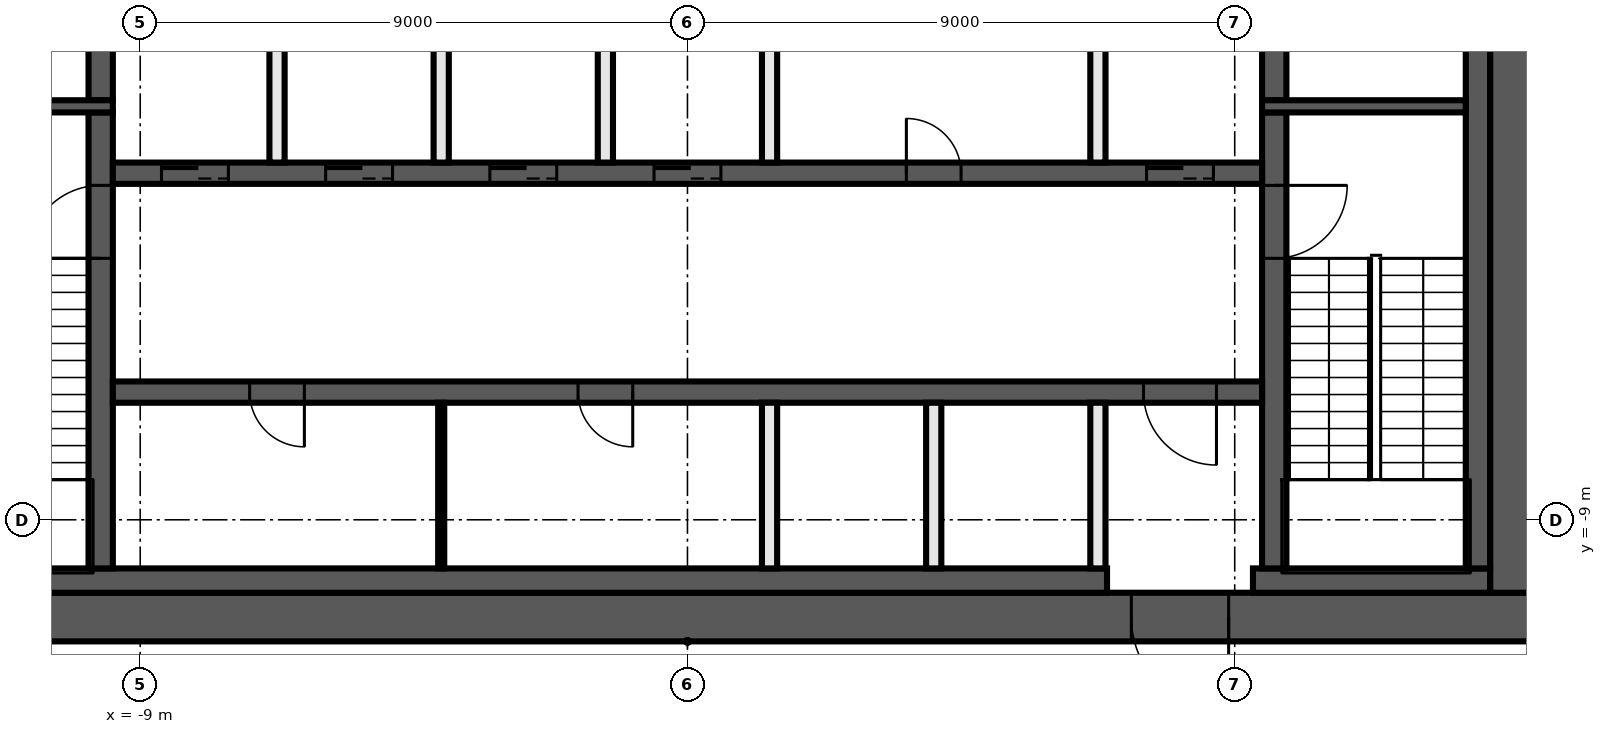
"""IFC4 building model, lengths in metres.
Left out: names, types, materials, properties, quantities, classifications, styles, units other than length and angle.
Written with IfcOpenShell. Run it as: python <this file> out.ifc"""

import sys

from ifc_helpers import new_model, si_unit, direction, frame, frame_2d, origin, place, context, subcontext, project, spatial, rectangle, extrude, element, fill, save


model = new_model("IFC4")
c1 = context("Model", 3, precision=1e-05, world=origin(), true_north=direction((0.0, 1.0)))
c2 = subcontext(c1, "Body", "Model", "MODEL_VIEW")
j1 = project(units=[si_unit("LENGTHUNIT", "METRE"), si_unit("PLANEANGLEUNIT", "RADIAN")], contexts=[c1])
p1 = place(None, origin())
s1 = spatial("IfcSite", under=j1, at=p1, CompositionType="ELEMENT")
p2 = place(p1, origin())
s2 = spatial("IfcBuilding", under=s1, at=p2, CompositionType="ELEMENT")
p3 = place(p2, frame((0.0, 0.0, 215.6)))
s3 = spatial("IfcBuildingStorey", under=s2, at=p3, CompositionType="ELEMENT", Elevation=215.6)
p4 = place(p3, frame((14.0, -10.6, 0.0), z_axis=(0.0, 0.0, 1.0), x_axis=(-1.0, 0.0, 0.0)))
e1 = element("IfcWall", 1, at=p4, inside=s3, PredefinedType="SHEAR", context=c2, shape_type="SweptSolid", body=[
    extrude(rectangle(XDim=28.0, YDim=0.8, at=frame_2d((14.0, 0.0))), origin(), (0.0, 0.0, 1.0), 4.4),
])
p5 = place(p4, frame((5.1, 0.0, 0.0)))
e2 = element("IfcOpeningElement", 2, at=p5, cuts=e1, PredefinedType="OPENING", context=c2, shape_type="SweptSolid", body=[
    extrude(rectangle(XDim=1.6, YDim=2.1, at=frame_2d((0.8, 1.05))), frame((0.0, 0.41, 0.0), z_axis=(0.0, -1.0, 0.0), x_axis=(1.0, 0.0, 0.0)), (0.0, 0.0, 1.0), 0.82),
])
p6 = place(p3, frame((13.6, 10.2, 0.0), z_axis=(0.0, 0.0, 1.0), x_axis=(0.0, -1.0, 0.0)))
e3 = element("IfcWall", 3, at=p6, inside=s3, PredefinedType="SHEAR", context=c2, shape_type="SweptSolid", body=[
    extrude(rectangle(XDim=20.4, YDim=0.8, at=frame_2d((10.2, 0.0))), origin(), (0.0, 0.0, 1.0), 4.4),
])
p7 = place(p3, frame((13.2, -10.0, 0.0), z_axis=(0.0, 0.0, 1.0), x_axis=(-1.0, 0.0, 0.0)))
e4 = element("IfcWall", 4, at=p7, inside=s3, PredefinedType="SHEAR", context=c2, shape_type="SweptSolid", body=[
    extrude(rectangle(XDim=3.9, YDim=0.4, at=frame_2d((1.95, 0.0))), origin(), (0.0, 0.0, 1.0), 4.4),
])
p8 = place(p3, frame((6.9, -10.0, 0.0), z_axis=(0.0, 0.0, 1.0), x_axis=(-1.0, 0.0, 0.0)))
e5 = element("IfcWall", 5, at=p8, inside=s3, PredefinedType="SHEAR", context=c2, shape_type="SweptSolid", body=[
    extrude(rectangle(XDim=20.1, YDim=0.4, at=frame_2d((10.05, 0.0))), origin(), (0.0, 0.0, 1.0), 4.4),
])
p9 = place(p3, frame((13.0, 9.8, 0.0), z_axis=(0.0, 0.0, 1.0), x_axis=(0.0, -1.0, 0.0)))
e6 = element("IfcWall", 6, at=p9, inside=s3, PredefinedType="SHEAR", context=c2, shape_type="SweptSolid", body=[
    extrude(rectangle(XDim=19.6, YDim=0.4, at=frame_2d((9.8, 0.0))), origin(), (0.0, 0.0, 1.0), 4.4),
])
p10 = place(p3, frame((9.65, -2.3, 0.0), z_axis=(0.0, 0.0, 1.0), x_axis=(0.0, -1.0, 0.0)))
e7 = element("IfcWall", 7, at=p10, inside=s3, PredefinedType="SHEAR", context=c2, shape_type="SweptSolid", body=[
    extrude(rectangle(XDim=7.5, YDim=0.4, at=frame_2d((3.75, 0.0))), origin(), (0.0, 0.0, 1.0), 4.4),
])
p11 = place(p10, frame((1.2, 0.0, 0.0)))
e8 = element("IfcOpeningElement", 8, at=p11, cuts=e7, PredefinedType="OPENING", context=c2, shape_type="SweptSolid", body=[
    extrude(rectangle(XDim=1.2, YDim=2.1, at=frame_2d((0.6, 1.05))), frame((0.0, 0.21, 0.0), z_axis=(0.0, -1.0, 0.0), x_axis=(1.0, 0.0, 0.0)), (0.0, 0.0, 1.0), 0.42),
])
p12 = place(p3, frame((9.65, 2.1, 0.0), z_axis=(0.0, 0.0, 1.0), x_axis=(0.0, -1.0, 0.0)))
e9 = element("IfcWall", 9, at=p12, inside=s3, PredefinedType="SHEAR", context=c2, shape_type="SweptSolid", body=[
    extrude(rectangle(XDim=4.2, YDim=0.4, at=frame_2d((2.1, 0.0))), origin(), (0.0, 0.0, 1.0), 4.4),
])
p13 = place(p12, frame((0.15, 0.0, 0.0)))
e10 = element("IfcOpeningElement", 10, at=p13, cuts=e9, PredefinedType="OPENING", context=c2, shape_type="SweptSolid", body=[
    extrude(rectangle(XDim=0.9, YDim=2.1, at=frame_2d((0.45, 1.05))), frame((0.0, 0.21, 0.0), z_axis=(0.0, -1.0, 0.0), x_axis=(1.0, 0.0, 0.0)), (0.0, 0.0, 1.0), 0.42),
])
p14 = place(p3, frame((-9.65, -9.8, 0.0), z_axis=(0.0, 0.0, 1.0), x_axis=(0.0, 1.0, 0.0)))
e11 = element("IfcWall", 11, at=p14, inside=s3, PredefinedType="SHEAR", context=c2, shape_type="SweptSolid", body=[
    extrude(rectangle(XDim=7.5, YDim=0.4, at=frame_2d((3.75, 0.0))), origin(), (0.0, 0.0, 1.0), 4.4),
])
p15 = place(p14, frame((5.1, 0.0, 0.0)))
e12 = element("IfcOpeningElement", 12, at=p15, cuts=e11, PredefinedType="OPENING", context=c2, shape_type="SweptSolid", body=[
    extrude(rectangle(XDim=1.2, YDim=2.1, at=frame_2d((0.6, 1.05))), frame((0.0, 0.21, 0.0), z_axis=(0.0, -1.0, 0.0), x_axis=(1.0, 0.0, 0.0)), (0.0, 0.0, 1.0), 0.42),
])
p16 = place(p3, frame((-9.65, -2.1, 0.0), z_axis=(0.0, 0.0, 1.0), x_axis=(0.0, 1.0, 0.0)))
e13 = element("IfcWall", 13, at=p16, inside=s3, PredefinedType="SHEAR", context=c2, shape_type="SweptSolid", body=[
    extrude(rectangle(XDim=4.2, YDim=0.4, at=frame_2d((2.1, 0.0))), origin(), (0.0, 0.0, 1.0), 4.4),
])
for number, where, z_axis, x_axis in (
    (14, (9.45, -2.2, 0.0), (0.0, 0.0, 1.0), (1.0, 0.0, 0.0)),
    (15, (-9.45, -2.2, 0.0), (0.0, 0.0, 1.0), (-1.0, 0.0, 0.0)),
):
    element("IfcWall", number, at=place(p3, frame(where, z_axis=z_axis, x_axis=x_axis)), inside=s3, PredefinedType="SHEAR", context=c2, shape_type="SweptSolid", body=[
        extrude(rectangle(XDim=3.35, YDim=0.2, at=frame_2d((1.675, 0.0))), origin(), (0.0, 0.0, 1.0), 4.4),
    ])
p17 = place(p3, frame((-9.45, -3.3, 0.0), z_axis=(0.0, 0.0, 1.0), x_axis=(1.0, 0.0, 0.0)))
e16 = element("IfcWall", 16, at=p17, inside=s3, PredefinedType="SHEAR", context=c2, shape_type="SweptSolid", body=[
    extrude(rectangle(XDim=18.9, YDim=0.35, at=frame_2d((9.45, 0.0))), origin(), (0.0, 0.0, 1.0), 4.4),
])
p18 = place(p17, frame((0.8, 0.0, 0.0)))
e17 = element("IfcOpeningElement", 17, at=p18, cuts=e16, PredefinedType="OPENING", context=c2, shape_type="SweptSolid", body=[
    extrude(rectangle(XDim=1.1, YDim=2.1, at=frame_2d((0.55, 1.05))), frame((0.0, 0.185, 0.0), z_axis=(0.0, -1.0, 0.0), x_axis=(1.0, 0.0, 0.0)), (0.0, 0.0, 1.0), 0.37),
])
p19 = place(p17, frame((3.5, 0.0, 0.0)))
e18 = element("IfcOpeningElement", 18, at=p19, cuts=e16, PredefinedType="OPENING", context=c2, shape_type="SweptSolid", body=[
    extrude(rectangle(XDim=1.1, YDim=2.1, at=frame_2d((0.55, 1.05))), frame((0.0, 0.185, 0.0), z_axis=(0.0, -1.0, 0.0), x_axis=(1.0, 0.0, 0.0)), (0.0, 0.0, 1.0), 0.37),
])
p20 = place(p17, frame((6.2, 0.0, 0.0)))
e19 = element("IfcOpeningElement", 19, at=p20, cuts=e16, PredefinedType="OPENING", context=c2, shape_type="SweptSolid", body=[
    extrude(rectangle(XDim=1.1, YDim=2.1, at=frame_2d((0.55, 1.05))), frame((0.0, 0.185, 0.0), z_axis=(0.0, -1.0, 0.0), x_axis=(1.0, 0.0, 0.0)), (0.0, 0.0, 1.0), 0.37),
])
p21 = place(p17, frame((8.9, 0.0, 0.0)))
e20 = element("IfcOpeningElement", 20, at=p21, cuts=e16, PredefinedType="OPENING", context=c2, shape_type="SweptSolid", body=[
    extrude(rectangle(XDim=1.1, YDim=2.1, at=frame_2d((0.55, 1.05))), frame((0.0, 0.185, 0.0), z_axis=(0.0, -1.0, 0.0), x_axis=(1.0, 0.0, 0.0)), (0.0, 0.0, 1.0), 0.37),
])
p22 = place(p17, frame((17.0, 0.0, 0.0)))
e21 = element("IfcOpeningElement", 21, at=p22, cuts=e16, PredefinedType="OPENING", context=c2, shape_type="SweptSolid", body=[
    extrude(rectangle(XDim=1.1, YDim=2.1, at=frame_2d((0.55, 1.05))), frame((0.0, 0.185, 0.0), z_axis=(0.0, -1.0, 0.0), x_axis=(1.0, 0.0, 0.0)), (0.0, 0.0, 1.0), 0.37),
])
p23 = place(p17, frame((13.05, 0.0, 0.0)))
e22 = element("IfcOpeningElement", 22, at=p23, cuts=e16, PredefinedType="OPENING", context=c2, shape_type="SweptSolid", body=[
    extrude(rectangle(XDim=0.9, YDim=2.1, at=frame_2d((0.45, 1.05))), frame((0.0, 0.185, 0.0), z_axis=(0.0, -1.0, 0.0), x_axis=(1.0, 0.0, 0.0)), (0.0, 0.0, 1.0), 0.37),
])
p24 = place(p3, frame((9.45, -6.9, 0.0), z_axis=(0.0, 0.0, 1.0), x_axis=(-1.0, 0.0, 0.0)))
e23 = element("IfcWall", 23, at=p24, inside=s3, PredefinedType="SHEAR", context=c2, shape_type="SweptSolid", body=[
    extrude(rectangle(XDim=18.9, YDim=0.35, at=frame_2d((9.45, 0.0))), origin(), (0.0, 0.0, 1.0), 4.4),
])
p25 = place(p24, frame((0.75, 0.0, 0.0)))
e24 = element("IfcOpeningElement", 24, at=p25, cuts=e23, PredefinedType="OPENING", context=c2, shape_type="SweptSolid", body=[
    extrude(rectangle(XDim=1.2, YDim=2.1, at=frame_2d((0.6, 1.05))), frame((0.0, 0.185, 0.0), z_axis=(0.0, -1.0, 0.0), x_axis=(1.0, 0.0, 0.0)), (0.0, 0.0, 1.0), 0.37),
])
p26 = place(p24, frame((15.75, 0.0, 0.0)))
e25 = element("IfcOpeningElement", 25, at=p26, cuts=e23, PredefinedType="OPENING", context=c2, shape_type="SweptSolid", body=[
    extrude(rectangle(XDim=0.9, YDim=2.1, at=frame_2d((0.45, 1.05))), frame((0.0, 0.185, 0.0), z_axis=(0.0, -1.0, 0.0), x_axis=(1.0, 0.0, 0.0)), (0.0, 0.0, 1.0), 0.37),
])
p27 = place(p24, frame((10.35, 0.0, 0.0)))
e26 = element("IfcOpeningElement", 26, at=p27, cuts=e23, PredefinedType="OPENING", context=c2, shape_type="SweptSolid", body=[
    extrude(rectangle(XDim=0.9, YDim=2.1, at=frame_2d((0.45, 1.05))), frame((0.0, 0.185, 0.0), z_axis=(0.0, -1.0, 0.0), x_axis=(1.0, 0.0, 0.0)), (0.0, 0.0, 1.0), 0.37),
])
for number, where, z_axis, x_axis in (
    (27, (6.75, -9.8, 0.0), (0.0, 0.0, 1.0), (0.0, 1.0, 0.0)),
    (28, (6.75, -3.125, 0.0), (0.0, 0.0, 1.0), (0.0, 1.0, 0.0)),
    (29, (4.05, -9.8, 0.0), (0.0, 0.0, 1.0), (0.0, 1.0, 0.0)),
    (30, (1.35, -9.8, 0.0), (0.0, 0.0, 1.0), (0.0, 1.0, 0.0)),
    (31, (1.35, -3.125, 0.0), (0.0, 0.0, 1.0), (0.0, 1.0, 0.0)),
    (32, (-1.35, -3.125, 0.0), (0.0, 0.0, 1.0), (0.0, 1.0, 0.0)),
):
    element("IfcWall", number, at=place(p3, frame(where, z_axis=z_axis, x_axis=x_axis)), inside=s3, PredefinedType="SOLIDWALL", context=c2, shape_type="SweptSolid", body=[
        extrude(rectangle(XDim=2.725, YDim=0.25, at=frame_2d((1.363, 0.0))), origin(), (0.0, 0.0, 1.0), 4.4),
    ])
p28 = place(p3, frame((-4.05, -9.8, 0.0), z_axis=(0.0, 0.0, 1.0), x_axis=(0.0, 1.0, 0.0)))
e33 = element("IfcWall", 33, at=p28, inside=s3, PredefinedType="PARTITIONING", context=c2, shape_type="SweptSolid", body=[
    extrude(rectangle(XDim=2.725, YDim=0.1, at=frame_2d((1.363, 0.0))), origin(), (0.0, 0.0, 1.0), 4.4),
])
for number, where, z_axis, x_axis in (
    (34, (-4.05, -3.125, 0.0), (0.0, 0.0, 1.0), (0.0, 1.0, 0.0)),
    (35, (-6.75, -3.125, 0.0), (0.0, 0.0, 1.0), (0.0, 1.0, 0.0)),
):
    element("IfcWall", number, at=place(p3, frame(where, z_axis=z_axis, x_axis=x_axis)), inside=s3, PredefinedType="SOLIDWALL", context=c2, shape_type="SweptSolid", body=[
        extrude(rectangle(XDim=2.725, YDim=0.25, at=frame_2d((1.363, 0.0))), origin(), (0.0, 0.0, 1.0), 4.4),
    ])
p29 = place(p18, origin())
e36 = element("IfcDoor", 36, at=p29, inside=s3, OperationType="DOUBLE_DOOR_SLIDING", PredefinedType="DOOR", context=c2, shape_type="SweptSolid", body=[
    extrude(rectangle(XDim=1.1, YDim=2.1, at=frame_2d((0.55, 1.05))), frame((0.0, 0.025, 0.0), z_axis=(0.0, -1.0, 0.0), x_axis=(1.0, 0.0, 0.0)), (0.0, 0.0, 1.0), 0.05),
])
fill(e17, e36)
p30 = place(p19, origin())
e37 = element("IfcDoor", 37, at=p30, inside=s3, OperationType="DOUBLE_DOOR_SLIDING", PredefinedType="DOOR", context=c2, shape_type="SweptSolid", body=[
    extrude(rectangle(XDim=1.1, YDim=2.1, at=frame_2d((0.55, 1.05))), frame((0.0, 0.025, 0.0), z_axis=(0.0, -1.0, 0.0), x_axis=(1.0, 0.0, 0.0)), (0.0, 0.0, 1.0), 0.05),
])
fill(e18, e37)
p31 = place(p20, origin())
e38 = element("IfcDoor", 38, at=p31, inside=s3, OperationType="DOUBLE_DOOR_SLIDING", PredefinedType="DOOR", context=c2, shape_type="SweptSolid", body=[
    extrude(rectangle(XDim=1.1, YDim=2.1, at=frame_2d((0.55, 1.05))), frame((0.0, 0.025, 0.0), z_axis=(0.0, -1.0, 0.0), x_axis=(1.0, 0.0, 0.0)), (0.0, 0.0, 1.0), 0.05),
])
fill(e19, e38)
p32 = place(p21, origin())
e39 = element("IfcDoor", 39, at=p32, inside=s3, OperationType="DOUBLE_DOOR_SLIDING", PredefinedType="DOOR", context=c2, shape_type="SweptSolid", body=[
    extrude(rectangle(XDim=1.1, YDim=2.1, at=frame_2d((0.55, 1.05))), frame((0.0, 0.025, 0.0), z_axis=(0.0, -1.0, 0.0), x_axis=(1.0, 0.0, 0.0)), (0.0, 0.0, 1.0), 0.05),
])
fill(e20, e39)
p33 = place(p22, origin())
e40 = element("IfcDoor", 40, at=p33, inside=s3, OperationType="DOUBLE_DOOR_SLIDING", PredefinedType="DOOR", context=c2, shape_type="SweptSolid", body=[
    extrude(rectangle(XDim=1.1, YDim=2.1, at=frame_2d((0.55, 1.05))), frame((0.0, 0.025, 0.0), z_axis=(0.0, -1.0, 0.0), x_axis=(1.0, 0.0, 0.0)), (0.0, 0.0, 1.0), 0.05),
])
fill(e21, e40)
p34 = place(p5, origin())
e41 = element("IfcDoor", 41, at=p34, inside=s3, OperationType="DOUBLE_DOOR_SINGLE_SWING", PredefinedType="DOOR", context=c2, shape_type="SweptSolid", body=[
    extrude(rectangle(XDim=1.6, YDim=2.1, at=frame_2d((0.8, 1.05))), frame((0.0, 0.025, 0.0), z_axis=(0.0, -1.0, 0.0), x_axis=(1.0, 0.0, 0.0)), (0.0, 0.0, 1.0), 0.05),
])
fill(e2, e41)
p35 = place(p25, origin())
e42 = element("IfcDoor", 42, at=p35, inside=s3, OperationType="SINGLE_SWING_LEFT", PredefinedType="DOOR", context=c2, shape_type="SweptSolid", body=[
    extrude(rectangle(XDim=1.2, YDim=2.1, at=frame_2d((0.6, 1.05))), frame((0.0, 0.025, 0.0), z_axis=(0.0, -1.0, 0.0), x_axis=(1.0, 0.0, 0.0)), (0.0, 0.0, 1.0), 0.05),
])
fill(e24, e42)
p36 = place(p23, origin())
e43 = element("IfcDoor", 43, at=p36, inside=s3, OperationType="SINGLE_SWING_RIGHT", PredefinedType="DOOR", context=c2, shape_type="SweptSolid", body=[
    extrude(rectangle(XDim=0.9, YDim=2.1, at=frame_2d((0.45, 1.05))), frame((0.0, 0.025, 0.0), z_axis=(0.0, -1.0, 0.0), x_axis=(1.0, 0.0, 0.0)), (0.0, 0.0, 1.0), 0.05),
])
fill(e22, e43)
p37 = place(p26, origin())
e44 = element("IfcDoor", 44, at=p37, inside=s3, OperationType="SINGLE_SWING_LEFT", PredefinedType="DOOR", context=c2, shape_type="SweptSolid", body=[
    extrude(rectangle(XDim=0.9, YDim=2.1, at=frame_2d((0.45, 1.05))), frame((0.0, 0.025, 0.0), z_axis=(0.0, -1.0, 0.0), x_axis=(1.0, 0.0, 0.0)), (0.0, 0.0, 1.0), 0.05),
])
fill(e25, e44)
p38 = place(p27, origin())
e45 = element("IfcDoor", 45, at=p38, inside=s3, OperationType="SINGLE_SWING_RIGHT", PredefinedType="DOOR", context=c2, shape_type="SweptSolid", body=[
    extrude(rectangle(XDim=0.9, YDim=2.1, at=frame_2d((0.45, 1.05))), frame((0.0, 0.025, 0.0), z_axis=(0.0, -1.0, 0.0), x_axis=(1.0, 0.0, 0.0)), (0.0, 0.0, 1.0), 0.05),
])
fill(e26, e45)
p39 = place(p11, origin())
e46 = element("IfcDoor", 46, at=p39, inside=s3, OperationType="SINGLE_SWING_RIGHT", PredefinedType="DOOR", context=c2, shape_type="SweptSolid", body=[
    extrude(rectangle(XDim=1.2, YDim=2.1, at=frame_2d((0.6, 1.05))), frame((0.0, 0.025, 0.0), z_axis=(0.0, -1.0, 0.0), x_axis=(1.0, 0.0, 0.0)), (0.0, 0.0, 1.0), 0.05),
])
fill(e8, e46)
p40 = place(p15, origin())
e47 = element("IfcDoor", 47, at=p40, inside=s3, OperationType="SINGLE_SWING_LEFT", PredefinedType="DOOR", context=c2, shape_type="SweptSolid", body=[
    extrude(rectangle(XDim=1.2, YDim=2.1, at=frame_2d((0.6, 1.05))), frame((0.0, 0.025, 0.0), z_axis=(0.0, -1.0, 0.0), x_axis=(1.0, 0.0, 0.0)), (0.0, 0.0, 1.0), 0.05),
])
fill(e12, e47)
save(model, sys.argv[1])
